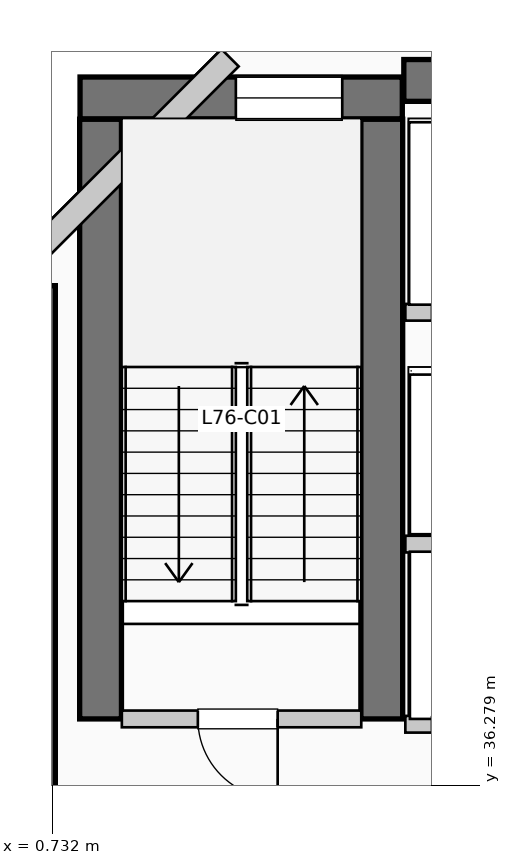
"""IFC4 building model, lengths in metres.
Left out: names, types, materials, properties, quantities, classifications, styles, units other than length and angle.
Written with IfcOpenShell. Run it as: python <this file> out.ifc"""

import sys

from ifc_helpers import new_model, si_unit, direction, frame, frame_2d, origin, place, context, subcontext, project, spatial, rectangle, extrude, element, fill, save


model = new_model("IFC4")
c1 = context("Model", 3, precision=1e-05, world=origin(), true_north=direction((0.0, 1.0)))
c2 = subcontext(c1, "Body", "Model", "MODEL_VIEW")
j1 = project(units=[si_unit("LENGTHUNIT", "METRE"), si_unit("PLANEANGLEUNIT", "RADIAN")], contexts=[c1])
p1 = place(None, origin())
s1 = spatial("IfcSite", under=j1, at=p1, CompositionType="ELEMENT")
p2 = place(p1, origin())
s2 = spatial("IfcBuilding", under=s1, at=p2, CompositionType="ELEMENT")
p3 = place(p2, frame((0.0, 0.0, 311.85)))
s3 = spatial("IfcBuildingStorey", under=s2, at=p3, CompositionType="ELEMENT", Elevation=311.85)
p4 = place(p3, frame((5.36, 45.55, 0.0), z_axis=(0.0, 0.0, 1.0), x_axis=(1.0, 0.0, 0.0)))
e1 = element("IfcWall", 1, at=p4, inside=s3, PredefinedType="SHEAR", context=c2, shape_type="SweptSolid", body=[
    extrude(rectangle(XDim=13.98, YDim=0.55, at=frame_2d((6.99, 0.0))), origin(), (0.0, 0.0, 1.0), 3.96),
])
p5 = place(p3, frame((0.5, 34.95, 0.0), z_axis=(0.0, 0.0, 1.0), x_axis=(0.0, 1.0, 0.0)))
e2 = element("IfcWall", 2, at=p5, inside=s3, PredefinedType="SHEAR", context=c2, shape_type="SweptSolid", body=[
    extrude(rectangle(XDim=7.9, YDim=0.55, at=frame_2d((3.95, 0.0))), origin(), (0.0, 0.0, 1.0), 3.96),
])
for number, where, z_axis, x_axis in (
    (3, (1.37, 37.15, 0.0), (0.0, 0.0, 1.0), (0.0, 1.0, 0.0)),
    (4, (5.07, 37.15, 0.0), (0.0, 0.0, 1.0), (0.0, 1.0, 0.0)),
):
    element("IfcWall", number, at=place(p3, frame(where, z_axis=z_axis, x_axis=x_axis)), inside=s3, PredefinedType="SHEAR", context=c2, shape_type="SweptSolid", body=[
        extrude(rectangle(XDim=7.89, YDim=0.55, at=frame_2d((3.945, 0.0))), origin(), (0.0, 0.0, 1.0), 3.96),
    ])
p6 = place(p3, frame((1.1, 45.32, 0.0), z_axis=(0.0, 0.0, 1.0), x_axis=(1.0, 0.0, 0.0)))
e5 = element("IfcWall", 5, at=p6, inside=s3, PredefinedType="SHEAR", context=c2, shape_type="SweptSolid", body=[
    extrude(rectangle(XDim=4.24, YDim=0.55, at=frame_2d((2.12, 0.0))), origin(), (0.0, 0.0, 1.0), 3.96),
])
p7 = place(p6, frame((2.05, 0.0, 1.05)))
e6 = element("IfcOpeningElement", 6, at=p7, cuts=e5, PredefinedType="OPENING", context=c2, shape_type="SweptSolid", body=[
    extrude(rectangle(XDim=1.4, YDim=1.8, at=frame_2d((0.7, 0.9))), frame((0.0, 0.285, 0.0), z_axis=(0.0, -1.0, 0.0), x_axis=(1.0, 0.0, 0.0)), (0.0, 0.0, 1.0), 0.57),
])
p8 = place(p3, frame((3.074, 45.848, 0.0), z_axis=(0.0, 0.0, 1.0), x_axis=(-0.707106781187, -0.707106781187, 0.0)))
e7 = element("IfcWall", 7, at=p8, inside=s3, PredefinedType="SOLIDWALL", context=c2, shape_type="SweptSolid", body=[
    extrude(rectangle(XDim=4.133, YDim=0.32, at=frame_2d((2.066, 0.0))), origin(), (0.0, 0.0, 1.0), 3.74),
])
p9 = place(p3, frame((1.65, 37.15, 0.0), z_axis=(0.0, 0.0, 1.0), x_axis=(1.0, 0.0, 0.0)))
e8 = element("IfcWall", 8, at=p9, inside=s3, PredefinedType="PARTITIONING", context=c2, shape_type="SweptSolid", body=[
    extrude(rectangle(XDim=3.15, YDim=0.22, at=frame_2d((1.575, 0.0))), origin(), (0.0, 0.0, 1.0), 3.74),
])
p10 = place(p9, frame((2.05, 0.0, 0.0), z_axis=(0.0, 0.0, 1.0), x_axis=(-1.0, 0.0, 0.0)))
e9 = element("IfcOpeningElement", 9, at=p10, cuts=e8, PredefinedType="OPENING", context=c2, shape_type="SweptSolid", body=[
    extrude(rectangle(XDim=1.05, YDim=2.15, at=frame_2d((0.525, 1.075))), frame((0.0, 0.12, 0.0), z_axis=(0.0, -1.0, 0.0), x_axis=(1.0, 0.0, 0.0)), (0.0, 0.0, 1.0), 0.24),
])
p11 = place(p3, frame((5.38, 37.08, 0.0), z_axis=(0.0, 0.0, 1.0), x_axis=(1.0, 0.0, 0.0)))
e10 = element("IfcWall", 10, at=p11, inside=s3, PredefinedType="PARTITIONING", context=c2, shape_type="SweptSolid", body=[
    extrude(rectangle(XDim=3.46, YDim=0.22, at=frame_2d((1.73, 0.0))), origin(), (0.0, 0.0, 1.0), 3.74),
])
p12 = place(p11, frame((1.55, 0.0, 0.0), z_axis=(0.0, 0.0, 1.0), x_axis=(-1.0, 0.0, 0.0)))
e11 = element("IfcOpeningElement", 11, at=p12, cuts=e10, PredefinedType="OPENING", context=c2, shape_type="SweptSolid", body=[
    extrude(rectangle(XDim=1.2, YDim=2.2, at=frame_2d((0.6, 1.1))), frame((0.0, 0.12, 0.0), z_axis=(0.0, -1.0, 0.0), x_axis=(1.0, 0.0, 0.0)), (0.0, 0.0, 1.0), 0.24),
])
p13 = place(p11, frame((3.22, 0.0, 0.0), z_axis=(0.0, 0.0, 1.0), x_axis=(-1.0, 0.0, 0.0)))
e12 = element("IfcOpeningElement", 12, at=p13, cuts=e10, PredefinedType="OPENING", context=c2, shape_type="SweptSolid", body=[
    extrude(rectangle(XDim=1.2, YDim=2.2, at=frame_2d((0.6, 1.1))), frame((0.0, 0.12, 0.0), z_axis=(0.0, -1.0, 0.0), x_axis=(1.0, 0.0, 0.0)), (0.0, 0.0, 1.0), 0.24),
])
p14 = place(p3, frame((5.38, 39.45, 0.0), z_axis=(0.0, 0.0, 1.0), x_axis=(1.0, 0.0, 0.0)))
e13 = element("IfcWall", 13, at=p14, inside=s3, PredefinedType="PARTITIONING", context=c2, shape_type="SweptSolid", body=[
    extrude(rectangle(XDim=3.46, YDim=0.22, at=frame_2d((1.73, 0.0))), origin(), (0.0, 0.0, 1.0), 3.74),
])
p15 = place(p3, frame((5.38, 42.5, 0.0), z_axis=(0.0, 0.0, 1.0), x_axis=(1.0, 0.0, 0.0)))
e14 = element("IfcWall", 14, at=p15, inside=s3, PredefinedType="PARTITIONING", context=c2, shape_type="SweptSolid", body=[
    extrude(rectangle(XDim=3.77, YDim=0.22, at=frame_2d((1.885, 0.0))), origin(), (0.0, 0.0, 1.0), 3.74),
])
p16 = place(p15, frame((1.75, 0.0, 0.0), z_axis=(0.0, 0.0, 1.0), x_axis=(-1.0, 0.0, 0.0)))
e15 = element("IfcOpeningElement", 15, at=p16, cuts=e14, PredefinedType="OPENING", context=c2, shape_type="SweptSolid", body=[
    extrude(rectangle(XDim=1.4, YDim=2.2, at=frame_2d((0.7, 1.1))), frame((0.0, 0.12, 0.0), z_axis=(0.0, -1.0, 0.0), x_axis=(1.0, 0.0, 0.0)), (0.0, 0.0, 1.0), 0.24),
])
p17 = place(p15, frame((3.53, 0.0, 0.0), z_axis=(0.0, 0.0, 1.0), x_axis=(-1.0, 0.0, 0.0)))
e16 = element("IfcOpeningElement", 16, at=p17, cuts=e14, PredefinedType="OPENING", context=c2, shape_type="SweptSolid", body=[
    extrude(rectangle(XDim=1.4, YDim=2.2, at=frame_2d((0.7, 1.1))), frame((0.0, 0.12, 0.0), z_axis=(0.0, -1.0, 0.0), x_axis=(1.0, 0.0, 0.0)), (0.0, 0.0, 1.0), 0.24),
])
p18 = place(p7, origin())
e17 = element("IfcWindow", 17, at=p18, inside=s3, PartitioningType="SINGLE_PANEL", PredefinedType="WINDOW", context=c2, shape_type="SweptSolid", body=[
    extrude(rectangle(XDim=1.4, YDim=1.8, at=frame_2d((0.7, 0.9))), frame((0.0, 0.03, 0.0), z_axis=(0.0, -1.0, 0.0), x_axis=(1.0, 0.0, 0.0)), (0.0, 0.0, 1.0), 0.06),
])
fill(e6, e17)
p19 = place(p10, origin())
e18 = element("IfcDoor", 18, at=p19, inside=s3, OperationType="SINGLE_SWING_RIGHT", PredefinedType="DOOR", context=c2, shape_type="SweptSolid", body=[
    extrude(rectangle(XDim=1.05, YDim=2.15, at=frame_2d((0.525, 1.075))), frame((0.0, 0.025, 0.0), z_axis=(0.0, -1.0, 0.0), x_axis=(1.0, 0.0, 0.0)), (0.0, 0.0, 1.0), 0.05),
])
fill(e9, e18)
save(model, sys.argv[1])
